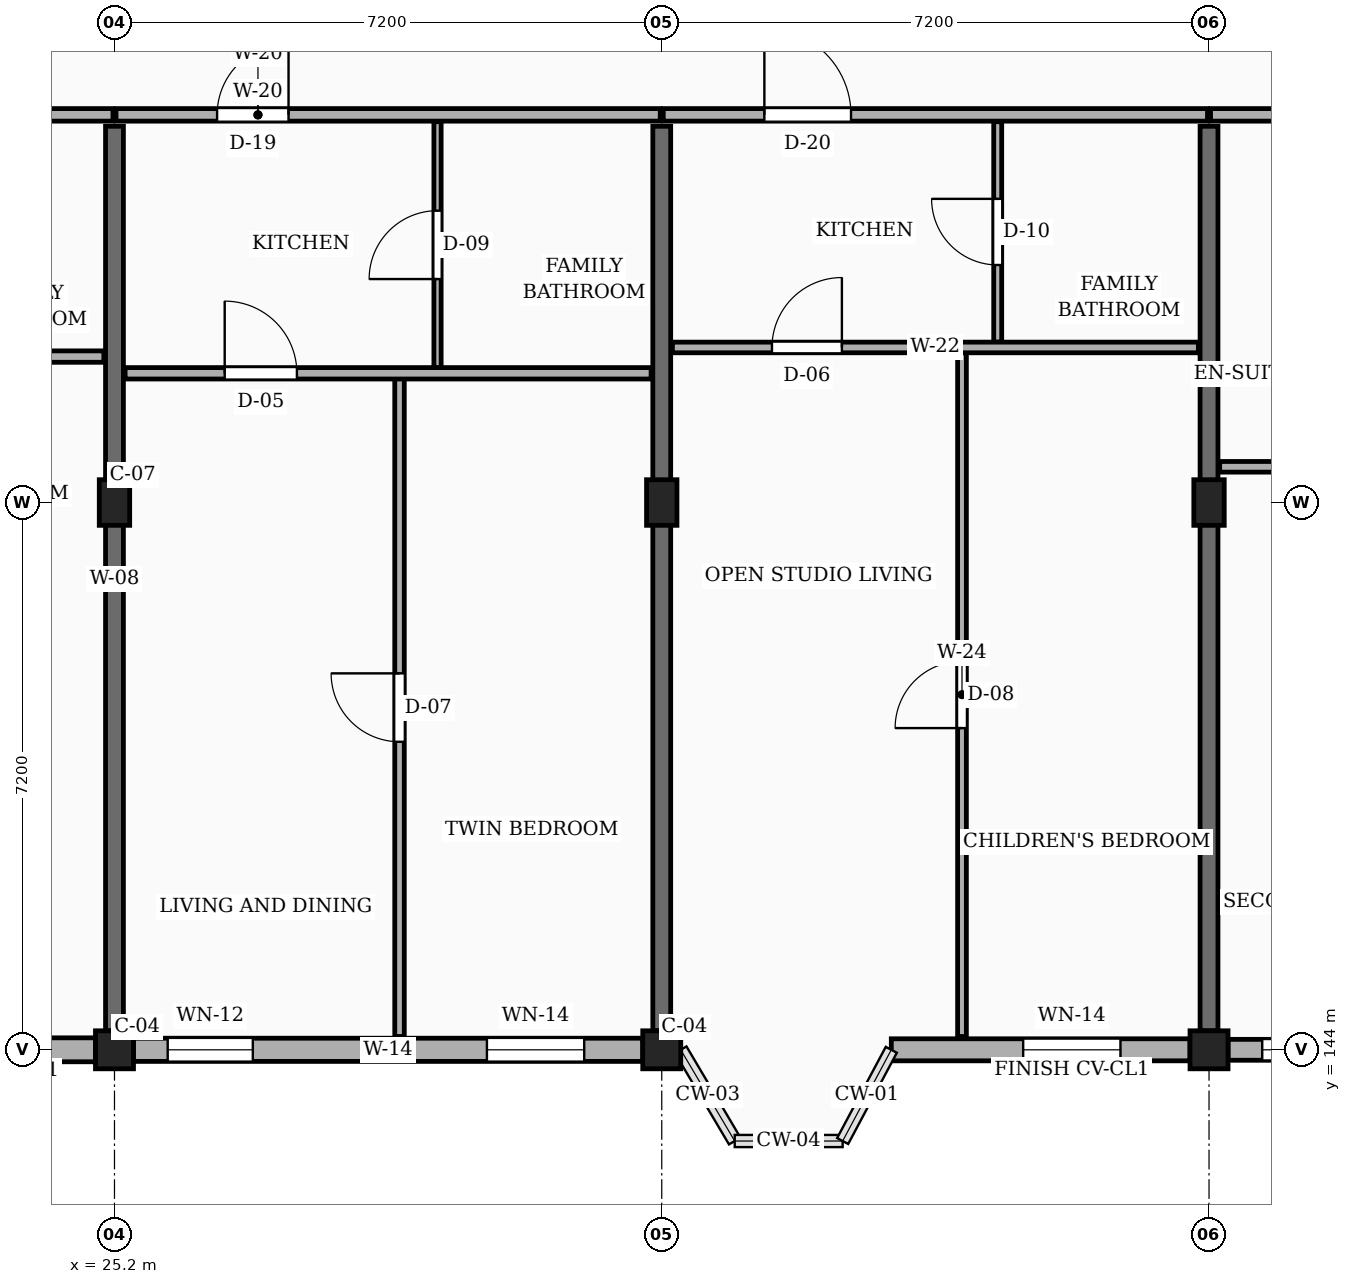
"""IFC4 building model, lengths in metres.
Left out: names, types, materials, properties, quantities, classifications, styles, units other than length and angle.
Written with IfcOpenShell. Run it as: python <this file> out.ifc"""

import sys

from ifc_helpers import new_model, si_unit, direction, frame, frame_2d, origin, origin_2d, place, context, subcontext, project, spatial, rectangle, extrude, element, fill, save


model = new_model("IFC4")
c1 = context("Model", 3, precision=1e-05, world=origin(), true_north=direction((0.0, 1.0)))
c2 = subcontext(c1, "Body", "Model", "MODEL_VIEW")
j1 = project(units=[si_unit("LENGTHUNIT", "METRE"), si_unit("PLANEANGLEUNIT", "RADIAN")], contexts=[c1])
p1 = place(None, origin())
s1 = spatial("IfcSite", under=j1, at=p1, CompositionType="ELEMENT")
p2 = place(p1, origin())
s2 = spatial("IfcBuilding", under=s1, at=p2, CompositionType="ELEMENT")
p3 = place(p2, frame((0.0, 0.0, 23.4)))
s3 = spatial("IfcBuildingStorey", under=s2, at=p3, CompositionType="ELEMENT", Elevation=23.4)
p4 = place(p3, frame((25.2, 144.0, 0.0), z_axis=(0.0, 0.0, 1.0), x_axis=(1.0, 0.0, 0.0)))
e1 = element("IfcColumn", 1, at=p4, inside=s3, PredefinedType="COLUMN", context=c2, shape_type="SweptSolid", body=[
    extrude(rectangle(XDim=0.5, YDim=0.5, at=origin_2d()), origin(), (0.0, 0.0, 1.0), 3.15),
])
p5 = place(p3, frame((25.2, 151.2, 0.0), z_axis=(0.0, 0.0, 1.0), x_axis=(1.0, 0.0, 0.0)))
e2 = element("IfcColumn", 2, at=p5, inside=s3, PredefinedType="COLUMN", context=c2, shape_type="SweptSolid", body=[
    extrude(rectangle(XDim=0.4, YDim=0.6, at=origin_2d()), origin(), (0.0, 0.0, 1.0), 3.15),
])
p6 = place(p3, frame((32.4, 144.0, 0.0), z_axis=(0.0, 0.0, 1.0), x_axis=(1.0, 0.0, 0.0)))
e3 = element("IfcColumn", 3, at=p6, inside=s3, PredefinedType="COLUMN", context=c2, shape_type="SweptSolid", body=[
    extrude(rectangle(XDim=0.5, YDim=0.5, at=origin_2d()), origin(), (0.0, 0.0, 1.0), 3.15),
])
p7 = place(p3, frame((32.4, 151.2, 0.0), z_axis=(0.0, 0.0, 1.0), x_axis=(1.0, 0.0, 0.0)))
e4 = element("IfcColumn", 4, at=p7, inside=s3, PredefinedType="COLUMN", context=c2, shape_type="SweptSolid", body=[
    extrude(rectangle(XDim=0.4, YDim=0.6, at=origin_2d()), origin(), (0.0, 0.0, 1.0), 3.15),
])
p8 = place(p3, frame((39.6, 144.0, 0.0), z_axis=(0.0, 0.0, 1.0), x_axis=(1.0, 0.0, 0.0)))
e5 = element("IfcColumn", 5, at=p8, inside=s3, PredefinedType="COLUMN", context=c2, shape_type="SweptSolid", body=[
    extrude(rectangle(XDim=0.5, YDim=0.5, at=origin_2d()), origin(), (0.0, 0.0, 1.0), 3.15),
])
p9 = place(p3, frame((39.6, 151.2, 0.0), z_axis=(0.0, 0.0, 1.0), x_axis=(1.0, 0.0, 0.0)))
e6 = element("IfcColumn", 6, at=p9, inside=s3, PredefinedType="COLUMN", context=c2, shape_type="SweptSolid", body=[
    extrude(rectangle(XDim=0.4, YDim=0.6, at=origin_2d()), origin(), (0.0, 0.0, 1.0), 3.15),
])
for number, where, z_axis, x_axis in (
    (7, (25.2, 144.25, 0.0), (0.0, 0.0, 1.0), (0.0, 1.0, 0.0)),
    (8, (32.4, 144.25, 0.0), (0.0, 0.0, 1.0), (0.0, 1.0, 0.0)),
    (9, (39.6, 144.25, 0.0), (0.0, 0.0, 1.0), (0.0, 1.0, 0.0)),
):
    element("IfcWall", number, at=place(p3, frame(where, z_axis=z_axis, x_axis=x_axis)), inside=s3, PredefinedType="SOLIDWALL", context=c2, shape_type="SweptSolid", body=[
        extrude(rectangle(XDim=11.9, YDim=0.235, at=frame_2d((5.95, 0.0))), origin(), (0.0, 0.0, 1.0), 2.185),
    ])
p10 = place(p3, frame((21.02, 144.0, 0.0), z_axis=(0.0, 0.0, 1.0), x_axis=(1.0, 0.0, 0.0)))
e10 = element("IfcWall", 10, at=p10, inside=s3, PredefinedType="SOLIDWALL", context=c2, shape_type="SweptSolid", body=[
    extrude(rectangle(XDim=3.93, YDim=0.315, at=frame_2d((1.965, 0.0))), origin(), (0.0, 0.0, 1.0), 2.455),
])
p11 = place(p10, frame((1.905, 0.0, 0.78)))
e11 = element("IfcOpeningElement", 11, at=p11, cuts=e10, PredefinedType="OPENING", context=c2, shape_type="SweptSolid", body=[
    extrude(rectangle(XDim=1.04, YDim=1.26, at=frame_2d((0.52, 0.63))), frame((0.0, 0.167, 0.0), z_axis=(0.0, -1.0, 0.0), x_axis=(1.0, 0.0, 0.0)), (0.0, 0.0, 1.0), 0.335),
])
p12 = place(p3, frame((25.45, 144.0, 0.0), z_axis=(0.0, 0.0, 1.0), x_axis=(1.0, 0.0, 0.0)))
e12 = element("IfcWall", 12, at=p12, inside=s3, PredefinedType="SOLIDWALL", context=c2, shape_type="SweptSolid", body=[
    extrude(rectangle(XDim=6.7, YDim=0.305, at=frame_2d((3.35, 0.0))), origin(), (0.0, 0.0, 1.0), 2.455),
])
p13 = place(p12, frame((0.45, 0.0, 0.78)))
e13 = element("IfcOpeningElement", 13, at=p13, cuts=e12, PredefinedType="OPENING", context=c2, shape_type="SweptSolid", body=[
    extrude(rectangle(XDim=1.12, YDim=1.26, at=frame_2d((0.56, 0.63))), frame((0.0, 0.163, 0.0), z_axis=(0.0, -1.0, 0.0), x_axis=(1.0, 0.0, 0.0)), (0.0, 0.0, 1.0), 0.325),
])
p14 = place(p12, frame((4.65, 0.0, 0.78)))
e14 = element("IfcOpeningElement", 14, at=p14, cuts=e12, PredefinedType="OPENING", context=c2, shape_type="SweptSolid", body=[
    extrude(rectangle(XDim=1.28, YDim=1.26, at=frame_2d((0.64, 0.63))), frame((0.0, 0.163, 0.0), z_axis=(0.0, -1.0, 0.0), x_axis=(1.0, 0.0, 0.0)), (0.0, 0.0, 1.0), 0.325),
])
p15 = place(p3, frame((35.42, 144.0, 0.0), z_axis=(0.0, 0.0, 1.0), x_axis=(1.0, 0.0, 0.0)))
e15 = element("IfcWall", 15, at=p15, inside=s3, PredefinedType="SOLIDWALL", context=c2, shape_type="SweptSolid", body=[
    extrude(rectangle(XDim=3.93, YDim=0.29, at=frame_2d((1.965, 0.0))), origin(), (0.0, 0.0, 1.0), 2.455),
])
p16 = place(p15, frame((1.735, 0.0, 0.78)))
e16 = element("IfcOpeningElement", 16, at=p16, cuts=e15, PredefinedType="OPENING", context=c2, shape_type="SweptSolid", body=[
    extrude(rectangle(XDim=1.28, YDim=1.26, at=frame_2d((0.64, 0.63))), frame((0.0, 0.155, 0.0), z_axis=(0.0, -1.0, 0.0), x_axis=(1.0, 0.0, 0.0)), (0.0, 0.0, 1.0), 0.31),
])
p17 = place(p3, frame((39.85, 144.0, 0.0), z_axis=(0.0, 0.0, 1.0), x_axis=(1.0, 0.0, 0.0)))
e17 = element("IfcWall", 17, at=p17, inside=s3, PredefinedType="SOLIDWALL", context=c2, shape_type="SweptSolid", body=[
    extrude(rectangle(XDim=6.7, YDim=0.275, at=frame_2d((3.35, 0.0))), origin(), (0.0, 0.0, 1.0), 2.455),
])
p18 = place(p17, frame((0.45, 0.0, 0.78)))
e18 = element("IfcOpeningElement", 18, at=p18, cuts=e17, PredefinedType="OPENING", context=c2, shape_type="SweptSolid", body=[
    extrude(rectangle(XDim=1.36, YDim=1.26, at=frame_2d((0.68, 0.63))), frame((0.0, 0.147, 0.0), z_axis=(0.0, -1.0, 0.0), x_axis=(1.0, 0.0, 0.0)), (0.0, 0.0, 1.0), 0.295),
])
p19 = place(p17, frame((4.65, 0.0, 0.78)))
e19 = element("IfcOpeningElement", 19, at=p19, cuts=e17, PredefinedType="OPENING", context=c2, shape_type="SweptSolid", body=[
    extrude(rectangle(XDim=0.9, YDim=1.36, at=frame_2d((0.45, 0.68))), frame((0.0, 0.147, 0.0), z_axis=(0.0, -1.0, 0.0), x_axis=(1.0, 0.0, 0.0)), (0.0, 0.0, 1.0), 0.295),
])
p20 = place(p3, frame((18.02, 156.3, 0.0), z_axis=(0.0, 0.0, 1.0), x_axis=(1.0, 0.0, 0.0)))
e20 = element("IfcWall", 20, at=p20, inside=s3, PredefinedType="PARTITIONING", context=c2, shape_type="SweptSolid", body=[
    extrude(rectangle(XDim=7.16, YDim=0.165, at=frame_2d((3.58, 0.0))), origin(), (0.0, 0.0, 1.0), 2.32),
])
p21 = place(p20, frame((1.33, 0.0, 0.0)))
e21 = element("IfcOpeningElement", 21, at=p21, cuts=e20, PredefinedType="OPENING", context=c2, shape_type="SweptSolid", body=[
    extrude(rectangle(XDim=1.0, YDim=2.15, at=frame_2d((0.5, 1.075))), frame((0.0, 0.093, 0.0), z_axis=(0.0, -1.0, 0.0), x_axis=(1.0, 0.0, 0.0)), (0.0, 0.0, 1.0), 0.185),
])
p22 = place(p3, frame((25.22, 156.3, 0.0), z_axis=(0.0, 0.0, 1.0), x_axis=(1.0, 0.0, 0.0)))
e22 = element("IfcWall", 22, at=p22, inside=s3, PredefinedType="PARTITIONING", context=c2, shape_type="SweptSolid", body=[
    extrude(rectangle(XDim=7.16, YDim=0.165, at=frame_2d((3.58, 0.0))), origin(), (0.0, 0.0, 1.0), 2.32),
])
p23 = place(p22, frame((1.33, 0.0, 0.0)))
e23 = element("IfcOpeningElement", 23, at=p23, cuts=e22, PredefinedType="OPENING", context=c2, shape_type="SweptSolid", body=[
    extrude(rectangle(XDim=0.94, YDim=2.12, at=frame_2d((0.47, 1.06))), frame((0.0, 0.093, 0.0), z_axis=(0.0, -1.0, 0.0), x_axis=(1.0, 0.0, 0.0)), (0.0, 0.0, 1.0), 0.185),
])
p24 = place(p3, frame((32.42, 156.3, 0.0), z_axis=(0.0, 0.0, 1.0), x_axis=(1.0, 0.0, 0.0)))
e24 = element("IfcWall", 24, at=p24, inside=s3, PredefinedType="PARTITIONING", context=c2, shape_type="SweptSolid", body=[
    extrude(rectangle(XDim=7.16, YDim=0.165, at=frame_2d((3.58, 0.0))), origin(), (0.0, 0.0, 1.0), 2.32),
])
p25 = place(p24, frame((1.33, 0.0, 0.0)))
e25 = element("IfcOpeningElement", 25, at=p25, cuts=e24, PredefinedType="OPENING", context=c2, shape_type="SweptSolid", body=[
    extrude(rectangle(XDim=1.14, YDim=2.18, at=frame_2d((0.57, 1.09))), frame((0.0, 0.093, 0.0), z_axis=(0.0, -1.0, 0.0), x_axis=(1.0, 0.0, 0.0)), (0.0, 0.0, 1.0), 0.185),
])
p26 = place(p3, frame((39.62, 156.3, 0.0), z_axis=(0.0, 0.0, 1.0), x_axis=(1.0, 0.0, 0.0)))
e26 = element("IfcWall", 26, at=p26, inside=s3, PredefinedType="PARTITIONING", context=c2, shape_type="SweptSolid", body=[
    extrude(rectangle(XDim=7.16, YDim=0.165, at=frame_2d((3.58, 0.0))), origin(), (0.0, 0.0, 1.0), 2.32),
])
p27 = place(p26, frame((4.78, 0.0, 0.0)))
e27 = element("IfcOpeningElement", 27, at=p27, cuts=e26, PredefinedType="OPENING", context=c2, shape_type="SweptSolid", body=[
    extrude(rectangle(XDim=1.0, YDim=2.15, at=frame_2d((0.5, 1.075))), frame((0.0, 0.093, 0.0), z_axis=(0.0, -1.0, 0.0), x_axis=(1.0, 0.0, 0.0)), (0.0, 0.0, 1.0), 0.185),
])
p28 = place(p3, frame((18.14, 153.12, 0.0), z_axis=(0.0, 0.0, 1.0), x_axis=(1.0, 0.0, 0.0)))
e28 = element("IfcWall", 28, at=p28, inside=s3, PredefinedType="PARTITIONING", context=c2, shape_type="SweptSolid", body=[
    extrude(rectangle(XDim=6.92, YDim=0.15, at=frame_2d((3.46, 0.0))), origin(), (0.0, 0.0, 1.0), 2.32),
])
p29 = place(p28, frame((1.31, 0.0, 0.0)))
e29 = element("IfcOpeningElement", 29, at=p29, cuts=e28, PredefinedType="OPENING", context=c2, shape_type="SweptSolid", body=[
    extrude(rectangle(XDim=0.92, YDim=2.1, at=frame_2d((0.46, 1.05))), frame((0.0, 0.085, 0.0), z_axis=(0.0, -1.0, 0.0), x_axis=(1.0, 0.0, 0.0)), (0.0, 0.0, 1.0), 0.17),
])
p30 = place(p3, frame((28.95, 144.175, 0.0), z_axis=(0.0, 0.0, 1.0), x_axis=(0.0, 1.0, 0.0)))
e30 = element("IfcWall", 30, at=p30, inside=s3, PredefinedType="PARTITIONING", context=c2, shape_type="SweptSolid", body=[
    extrude(rectangle(XDim=8.655, YDim=0.125, at=frame_2d((4.328, 0.0))), origin(), (0.0, 0.0, 1.0), 2.32),
])
p31 = place(p30, frame((3.877, 0.0, 0.0)))
e31 = element("IfcOpeningElement", 31, at=p31, cuts=e30, PredefinedType="OPENING", context=c2, shape_type="SweptSolid", body=[
    extrude(rectangle(XDim=0.9, YDim=2.1, at=frame_2d((0.45, 1.05))), frame((0.0, 0.073, 0.0), z_axis=(0.0, -1.0, 0.0), x_axis=(1.0, 0.0, 0.0)), (0.0, 0.0, 1.0), 0.145),
])
p32 = place(p3, frame((29.45, 152.97, 0.0), z_axis=(0.0, 0.0, 1.0), x_axis=(0.0, 1.0, 0.0)))
e32 = element("IfcWall", 32, at=p32, inside=s3, PredefinedType="PARTITIONING", context=c2, shape_type="SweptSolid", body=[
    extrude(rectangle(XDim=3.24, YDim=0.095, at=frame_2d((1.62, 0.0))), origin(), (0.0, 0.0, 1.0), 2.32),
])
p33 = place(p32, frame((1.17, 0.0, 0.0)))
e33 = element("IfcOpeningElement", 33, at=p33, cuts=e32, PredefinedType="OPENING", context=c2, shape_type="SweptSolid", body=[
    extrude(rectangle(XDim=0.9, YDim=2.05, at=frame_2d((0.45, 1.025))), frame((0.0, 0.058, 0.0), z_axis=(0.0, -1.0, 0.0), x_axis=(1.0, 0.0, 0.0)), (0.0, 0.0, 1.0), 0.115),
])
p34 = place(p3, frame((25.34, 152.9, 0.0), z_axis=(0.0, 0.0, 1.0), x_axis=(1.0, 0.0, 0.0)))
e34 = element("IfcWall", 34, at=p34, inside=s3, PredefinedType="PARTITIONING", context=c2, shape_type="SweptSolid", body=[
    extrude(rectangle(XDim=6.92, YDim=0.15, at=frame_2d((3.46, 0.0))), origin(), (0.0, 0.0, 1.0), 2.32),
])
p35 = place(p34, frame((1.31, 0.0, 0.0)))
e35 = element("IfcOpeningElement", 35, at=p35, cuts=e34, PredefinedType="OPENING", context=c2, shape_type="SweptSolid", body=[
    extrude(rectangle(XDim=0.95, YDim=2.1, at=frame_2d((0.475, 1.05))), frame((0.0, 0.085, 0.0), z_axis=(0.0, -1.0, 0.0), x_axis=(1.0, 0.0, 0.0)), (0.0, 0.0, 1.0), 0.17),
])
p36 = place(p3, frame((36.35, 144.175, 0.0), z_axis=(0.0, 0.0, 1.0), x_axis=(0.0, 1.0, 0.0)))
e36 = element("IfcWall", 36, at=p36, inside=s3, PredefinedType="PARTITIONING", context=c2, shape_type="SweptSolid", body=[
    extrude(rectangle(XDim=8.995, YDim=0.115, at=frame_2d((4.498, 0.0))), origin(), (0.0, 0.0, 1.0), 2.32),
])
p37 = place(p36, frame((4.058, 0.0, 0.0)))
e37 = element("IfcOpeningElement", 37, at=p37, cuts=e36, PredefinedType="OPENING", context=c2, shape_type="SweptSolid", body=[
    extrude(rectangle(XDim=0.88, YDim=2.08, at=frame_2d((0.44, 1.04))), frame((0.0, 0.067, 0.0), z_axis=(0.0, -1.0, 0.0), x_axis=(1.0, 0.0, 0.0)), (0.0, 0.0, 1.0), 0.135),
])
p38 = place(p3, frame((36.82, 153.31, 0.0), z_axis=(0.0, 0.0, 1.0), x_axis=(0.0, 1.0, 0.0)))
e38 = element("IfcWall", 38, at=p38, inside=s3, PredefinedType="PARTITIONING", context=c2, shape_type="SweptSolid", body=[
    extrude(rectangle(XDim=2.9, YDim=0.105, at=frame_2d((1.45, 0.0))), origin(), (0.0, 0.0, 1.0), 2.32),
])
p39 = place(p38, frame((1.015, 0.0, 0.0)))
e39 = element("IfcOpeningElement", 39, at=p39, cuts=e38, PredefinedType="OPENING", context=c2, shape_type="SweptSolid", body=[
    extrude(rectangle(XDim=0.87, YDim=2.05, at=frame_2d((0.435, 1.025))), frame((0.0, 0.062, 0.0), z_axis=(0.0, -1.0, 0.0), x_axis=(1.0, 0.0, 0.0)), (0.0, 0.0, 1.0), 0.125),
])
p40 = place(p3, frame((32.54, 153.24, 0.0), z_axis=(0.0, 0.0, 1.0), x_axis=(1.0, 0.0, 0.0)))
e40 = element("IfcWall", 40, at=p40, inside=s3, PredefinedType="PARTITIONING", context=c2, shape_type="SweptSolid", body=[
    extrude(rectangle(XDim=6.92, YDim=0.14, at=frame_2d((3.46, 0.0))), origin(), (0.0, 0.0, 1.0), 2.32),
])
p41 = place(p40, frame((1.31, 0.0, 0.0)))
e41 = element("IfcOpeningElement", 41, at=p41, cuts=e40, PredefinedType="OPENING", context=c2, shape_type="SweptSolid", body=[
    extrude(rectangle(XDim=0.92, YDim=2.1, at=frame_2d((0.46, 1.05))), frame((0.0, 0.08, 0.0), z_axis=(0.0, -1.0, 0.0), x_axis=(1.0, 0.0, 0.0)), (0.0, 0.0, 1.0), 0.16),
])
p42 = place(p3, frame((39.74, 151.67, 0.0), z_axis=(0.0, 0.0, 1.0), x_axis=(1.0, 0.0, 0.0)))
e42 = element("IfcWall", 42, at=p42, inside=s3, PredefinedType="PARTITIONING", context=c2, shape_type="SweptSolid", body=[
    extrude(rectangle(XDim=6.92, YDim=0.14, at=frame_2d((3.46, 0.0))), origin(), (0.0, 0.0, 1.0), 2.32),
])
p43 = place(p42, frame((4.66, 0.0, 0.0)))
e43 = element("IfcOpeningElement", 43, at=p43, cuts=e42, PredefinedType="OPENING", context=c2, shape_type="SweptSolid", body=[
    extrude(rectangle(XDim=0.95, YDim=2.1, at=frame_2d((0.475, 1.05))), frame((0.0, 0.08, 0.0), z_axis=(0.0, -1.0, 0.0), x_axis=(1.0, 0.0, 0.0)), (0.0, 0.0, 1.0), 0.16),
])
p44 = place(p13, origin())
e44 = element("IfcWindow", 44, at=p44, inside=s3, PartitioningType="SINGLE_PANEL", PredefinedType="WINDOW", context=c2, shape_type="SweptSolid", body=[
    extrude(rectangle(XDim=1.12, YDim=1.26, at=frame_2d((0.56, 0.63))), frame((0.0, 0.03, 0.0), z_axis=(0.0, -1.0, 0.0), x_axis=(1.0, 0.0, 0.0)), (0.0, 0.0, 1.0), 0.06),
])
fill(e13, e44)
p45 = place(p14, origin())
e45 = element("IfcWindow", 45, at=p45, inside=s3, PartitioningType="SINGLE_PANEL", PredefinedType="WINDOW", context=c2, shape_type="SweptSolid", body=[
    extrude(rectangle(XDim=1.28, YDim=1.26, at=frame_2d((0.64, 0.63))), frame((0.0, 0.03, 0.0), z_axis=(0.0, -1.0, 0.0), x_axis=(1.0, 0.0, 0.0)), (0.0, 0.0, 1.0), 0.06),
])
fill(e14, e45)
p46 = place(p16, origin())
e46 = element("IfcWindow", 46, at=p46, inside=s3, PartitioningType="SINGLE_PANEL", PredefinedType="WINDOW", context=c2, shape_type="SweptSolid", body=[
    extrude(rectangle(XDim=1.28, YDim=1.26, at=frame_2d((0.64, 0.63))), frame((0.0, 0.03, 0.0), z_axis=(0.0, -1.0, 0.0), x_axis=(1.0, 0.0, 0.0)), (0.0, 0.0, 1.0), 0.06),
])
fill(e16, e46)
p47 = place(p18, origin())
e47 = element("IfcWindow", 47, at=p47, inside=s3, PartitioningType="SINGLE_PANEL", PredefinedType="WINDOW", context=c2, shape_type="SweptSolid", body=[
    extrude(rectangle(XDim=1.36, YDim=1.26, at=frame_2d((0.68, 0.63))), frame((0.0, 0.03, 0.0), z_axis=(0.0, -1.0, 0.0), x_axis=(1.0, 0.0, 0.0)), (0.0, 0.0, 1.0), 0.06),
])
fill(e18, e47)
p48 = place(p23, origin())
e48 = element("IfcDoor", 48, at=p48, inside=s3, OperationType="SINGLE_SWING_RIGHT", PredefinedType="DOOR", context=c2, shape_type="SweptSolid", body=[
    extrude(rectangle(XDim=0.94, YDim=2.12, at=frame_2d((0.47, 1.06))), frame((0.0, 0.025, 0.0), z_axis=(0.0, -1.0, 0.0), x_axis=(1.0, 0.0, 0.0)), (0.0, 0.0, 1.0), 0.05),
])
fill(e23, e48)
p49 = place(p25, origin())
e49 = element("IfcDoor", 49, at=p49, inside=s3, OperationType="SINGLE_SWING_LEFT", PredefinedType="DOOR", context=c2, shape_type="SweptSolid", body=[
    extrude(rectangle(XDim=1.14, YDim=2.18, at=frame_2d((0.57, 1.09))), frame((0.0, 0.025, 0.0), z_axis=(0.0, -1.0, 0.0), x_axis=(1.0, 0.0, 0.0)), (0.0, 0.0, 1.0), 0.05),
])
fill(e25, e49)
p50 = place(p31, origin())
e50 = element("IfcDoor", 50, at=p50, inside=s3, OperationType="SINGLE_SWING_RIGHT", PredefinedType="DOOR", context=c2, shape_type="SweptSolid", body=[
    extrude(rectangle(XDim=0.9, YDim=2.1, at=frame_2d((0.45, 1.05))), frame((0.0, 0.025, 0.0), z_axis=(0.0, -1.0, 0.0), x_axis=(1.0, 0.0, 0.0)), (0.0, 0.0, 1.0), 0.05),
])
fill(e31, e50)
p51 = place(p33, origin())
e51 = element("IfcDoor", 51, at=p51, inside=s3, OperationType="SINGLE_SWING_LEFT", PredefinedType="DOOR", context=c2, shape_type="SweptSolid", body=[
    extrude(rectangle(XDim=0.9, YDim=2.05, at=frame_2d((0.45, 1.025))), frame((0.0, 0.025, 0.0), z_axis=(0.0, -1.0, 0.0), x_axis=(1.0, 0.0, 0.0)), (0.0, 0.0, 1.0), 0.05),
])
fill(e33, e51)
p52 = place(p35, origin())
e52 = element("IfcDoor", 52, at=p52, inside=s3, OperationType="SINGLE_SWING_LEFT", PredefinedType="DOOR", context=c2, shape_type="SweptSolid", body=[
    extrude(rectangle(XDim=0.95, YDim=2.1, at=frame_2d((0.475, 1.05))), frame((0.0, 0.025, 0.0), z_axis=(0.0, -1.0, 0.0), x_axis=(1.0, 0.0, 0.0)), (0.0, 0.0, 1.0), 0.05),
])
fill(e35, e52)
p53 = place(p37, origin())
e53 = element("IfcDoor", 53, at=p53, inside=s3, OperationType="SINGLE_SWING_LEFT", PredefinedType="DOOR", context=c2, shape_type="SweptSolid", body=[
    extrude(rectangle(XDim=0.88, YDim=2.08, at=frame_2d((0.44, 1.04))), frame((0.0, 0.025, 0.0), z_axis=(0.0, -1.0, 0.0), x_axis=(1.0, 0.0, 0.0)), (0.0, 0.0, 1.0), 0.05),
])
fill(e37, e53)
p54 = place(p39, origin())
e54 = element("IfcDoor", 54, at=p54, inside=s3, OperationType="SINGLE_SWING_RIGHT", PredefinedType="DOOR", context=c2, shape_type="SweptSolid", body=[
    extrude(rectangle(XDim=0.87, YDim=2.05, at=frame_2d((0.435, 1.025))), frame((0.0, 0.025, 0.0), z_axis=(0.0, -1.0, 0.0), x_axis=(1.0, 0.0, 0.0)), (0.0, 0.0, 1.0), 0.05),
])
fill(e39, e54)
p55 = place(p41, origin())
e55 = element("IfcDoor", 55, at=p55, inside=s3, OperationType="SINGLE_SWING_RIGHT", PredefinedType="DOOR", context=c2, shape_type="SweptSolid", body=[
    extrude(rectangle(XDim=0.92, YDim=2.1, at=frame_2d((0.46, 1.05))), frame((0.0, 0.025, 0.0), z_axis=(0.0, -1.0, 0.0), x_axis=(1.0, 0.0, 0.0)), (0.0, 0.0, 1.0), 0.05),
])
fill(e41, e55)
save(model, sys.argv[1])
